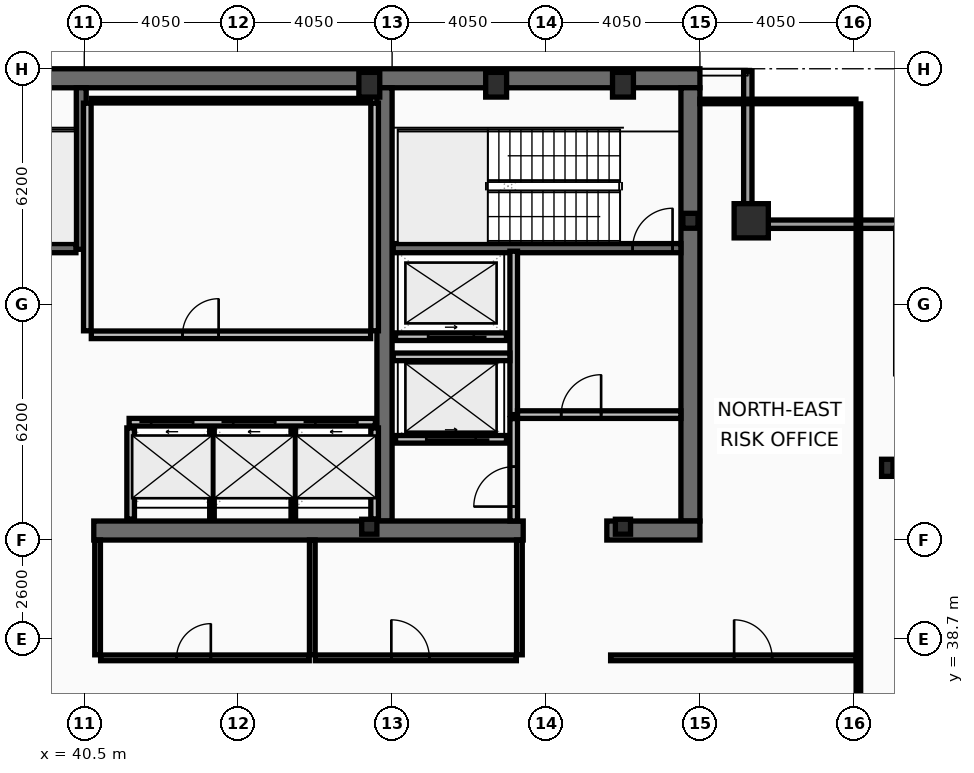
"""IFC4 building model, lengths in metres.
Left out: names, types, materials, properties, quantities, classifications, styles, units other than length and angle.
Written with IfcOpenShell. Run it as: python <this file> out.ifc"""

import sys

from ifc_helpers import new_model, si_unit, direction, frame, frame_2d, origin, origin_2d, place, context, subcontext, project, spatial, rectangle, hollow_rectangle, i_section, extrude, element, fill, save


model = new_model("IFC4")
c1 = context("Model", 3, precision=1e-05, world=origin(), true_north=direction((0.0, 1.0)))
c2 = subcontext(c1, "Body", "Model", "MODEL_VIEW")
j1 = project(units=[si_unit("LENGTHUNIT", "METRE"), si_unit("PLANEANGLEUNIT", "RADIAN")], contexts=[c1])
p1 = place(None, origin())
s1 = spatial("IfcSite", under=j1, at=p1, CompositionType="ELEMENT")
p2 = place(p1, origin())
s2 = spatial("IfcBuilding", under=s1, at=p2, CompositionType="ELEMENT")
p3 = place(p2, frame((0.0, 0.0, 305.8)))
s3 = spatial("IfcBuildingStorey", under=s2, at=p3, CompositionType="ELEMENT", Elevation=305.8)
p4 = place(p3, frame((16.2, 53.45, 0.0), z_axis=(0.0, 0.0, 1.0), x_axis=(1.0, 0.0, 0.0)))
e1 = element("IfcWall", 1, at=p4, inside=s3, PredefinedType="SHEAR", context=c2, shape_type="SweptSolid", body=[
    extrude(rectangle(XDim=40.5, YDim=0.5, at=frame_2d((20.25, 0.0))), origin(), (0.0, 0.0, 1.0), 4.24),
])
p5 = place(p3, frame((56.45, 53.2, 0.0), z_axis=(0.0, 0.0, 1.0), x_axis=(0.0, -1.0, 0.0)))
e2 = element("IfcWall", 2, at=p5, inside=s3, PredefinedType="SHEAR", context=c2, shape_type="SweptSolid", body=[
    extrude(rectangle(XDim=11.4, YDim=0.5, at=frame_2d((5.7, 0.0))), origin(), (0.0, 0.0, 1.0), 4.24),
])
p6 = place(p3, frame((48.4, 41.8, 0.0), z_axis=(0.0, 0.0, 1.0), x_axis=(0.0, 1.0, 0.0)))
e3 = element("IfcWall", 3, at=p6, inside=s3, PredefinedType="SHEAR", context=c2, shape_type="SweptSolid", body=[
    extrude(rectangle(XDim=11.4, YDim=0.4, at=frame_2d((5.7, 0.0))), origin(), (0.0, 0.0, 1.0), 4.24),
])
p7 = place(p3, frame((52.05, 41.55, 0.0), z_axis=(0.0, 0.0, 1.0), x_axis=(-1.0, 0.0, 0.0)))
e4 = element("IfcWall", 4, at=p7, inside=s3, PredefinedType="SHEAR", context=c2, shape_type="SweptSolid", body=[
    extrude(rectangle(XDim=11.3, YDim=0.5, at=frame_2d((5.65, 0.0))), origin(), (0.0, 0.0, 1.0), 4.24),
])
p8 = place(p3, frame((56.7, 41.55, 0.0), z_axis=(0.0, 0.0, 1.0), x_axis=(-1.0, 0.0, 0.0)))
e5 = element("IfcWall", 5, at=p8, inside=s3, PredefinedType="SHEAR", context=c2, shape_type="SweptSolid", body=[
    extrude(rectangle(XDim=2.45, YDim=0.5, at=frame_2d((1.225, 0.0))), origin(), (0.0, 0.0, 1.0), 4.24),
])
p9 = place(p3, frame((40.42, 48.95, 0.0), z_axis=(0.0, 0.0, 1.0), x_axis=(0.0, 1.0, 0.0)))
e6 = element("IfcWall", 6, at=p9, inside=s3, PredefinedType="SHEAR", context=c2, shape_type="SweptSolid", body=[
    extrude(rectangle(XDim=4.25, YDim=0.26, at=frame_2d((2.125, 0.0))), origin(), (0.0, 0.0, 1.0), 4.24),
])
p10 = place(p3, frame((48.63, 48.98, 0.0), z_axis=(0.0, 0.0, 1.0), x_axis=(1.0, 0.0, 0.0)))
e7 = element("IfcWall", 7, at=p10, inside=s3, PredefinedType="SHEAR", context=c2, shape_type="SweptSolid", body=[
    extrude(rectangle(XDim=7.57, YDim=0.24, at=frame_2d((3.785, 0.0))), origin(), (0.0, 0.0, 1.0), 4.24),
])
p11 = place(p10, frame((6.3, 0.0, 0.0)))
e8 = element("IfcOpeningElement", 8, at=p11, cuts=e7, PredefinedType="OPENING", context=c2, shape_type="SweptSolid", body=[
    extrude(rectangle(XDim=1.05, YDim=2.15, at=frame_2d((0.525, 1.075))), frame((0.0, 0.13, 0.0), z_axis=(0.0, -1.0, 0.0), x_axis=(1.0, 0.0, 0.0)), (0.0, 0.0, 1.0), 0.26),
])
p12 = place(p3, frame((32.72, 48.98, 0.0), z_axis=(0.0, 0.0, 1.0), x_axis=(1.0, 0.0, 0.0)))
e9 = element("IfcWall", 9, at=p12, inside=s3, PredefinedType="SHEAR", context=c2, shape_type="SweptSolid", body=[
    extrude(rectangle(XDim=7.56, YDim=0.24, at=frame_2d((3.78, 0.0))), origin(), (0.0, 0.0, 1.0), 4.24),
])
p13 = place(p12, frame((0.22, 0.0, 0.0)))
e10 = element("IfcOpeningElement", 10, at=p13, cuts=e9, PredefinedType="OPENING", context=c2, shape_type="SweptSolid", body=[
    extrude(rectangle(XDim=1.05, YDim=2.15, at=frame_2d((0.525, 1.075))), frame((0.0, 0.13, 0.0), z_axis=(0.0, -1.0, 0.0), x_axis=(1.0, 0.0, 0.0)), (0.0, 0.0, 1.0), 0.26),
])
p14 = place(p3, frame((58.05, 49.7, 0.0), z_axis=(0.0, 0.0, 1.0), x_axis=(1.0, 0.0, 0.0)))
e11 = element("IfcColumn", 11, at=p14, inside=s3, PredefinedType="COLUMN", context=c2, shape_type="SweptSolid", body=[
    extrude(hollow_rectangle(XDim=0.9, YDim=0.9, WallThickness=0.05, at=origin_2d()), origin(), (0.0, 0.0, 1.0), 4.4),
])
for number, where, z_axis, x_axis in (
    (12, (48.0, 53.28, 0.0), (0.0, 0.0, 1.0), (1.0, 0.0, 0.0)),
    (13, (51.337, 53.28, 0.0), (0.0, 0.0, 1.0), (1.0, 0.0, 0.0)),
    (14, (54.675, 53.28, 0.0), (0.0, 0.0, 1.0), (1.0, 0.0, 0.0)),
):
    element("IfcColumn", number, at=place(p3, frame(where, z_axis=z_axis, x_axis=x_axis)), inside=s3, PredefinedType="COLUMN", context=c2, shape_type="SweptSolid", body=[
        extrude(hollow_rectangle(XDim=0.55, YDim=0.65, WallThickness=0.04, at=origin_2d()), origin(), (0.0, 0.0, 1.0), 4.4),
    ])
p15 = place(p3, frame((61.63, 43.2, 0.0), z_axis=(0.0, 0.0, 1.0), x_axis=(1.0, 0.0, 0.0)))
e15 = element("IfcColumn", 15, at=p15, inside=s3, PredefinedType="COLUMN", context=c2, shape_type="SweptSolid", body=[
    extrude(i_section(OverallWidth=0.3, OverallDepth=0.45, WebThickness=0.014, FlangeThickness=0.026, at=origin_2d()), origin(), (0.0, 0.0, 1.0), 4.4),
])
for number, where, z_axis, x_axis in (
    (16, (56.45, 49.7, 0.0), (0.0, 0.0, 1.0), (1.0, 0.0, 0.0)),
    (17, (48.0, 41.65, 0.0), (0.0, 0.0, 1.0), (1.0, 0.0, 0.0)),
    (18, (54.675, 41.65, 0.0), (0.0, 0.0, 1.0), (1.0, 0.0, 0.0)),
):
    element("IfcColumn", number, at=place(p3, frame(where, z_axis=z_axis, x_axis=x_axis)), inside=s3, PredefinedType="COLUMN", context=c2, shape_type="SweptSolid", body=[
        extrude(i_section(OverallWidth=0.399, OverallDepth=0.393, WebThickness=0.023, FlangeThickness=0.037, at=origin_2d()), origin(), (0.0, 0.0, 1.0), 4.4),
    ])
p16 = place(p3, frame((57.96, 53.63, 0.0), z_axis=(0.0, 0.0, 1.0), x_axis=(0.0, -1.0, 0.0)))
e19 = element("IfcWall", 19, at=p16, inside=s3, PredefinedType="SOLIDWALL", context=c2, shape_type="SweptSolid", body=[
    extrude(rectangle(XDim=3.91, YDim=0.22, at=frame_2d((1.955, 0.0))), origin(), (0.0, 0.0, 1.0), 3.68),
])
p17 = place(p3, frame((57.85, 49.61, 0.0), z_axis=(0.0, 0.0, 1.0), x_axis=(1.0, 0.0, 0.0)))
e20 = element("IfcWall", 20, at=p17, inside=s3, PredefinedType="SOLIDWALL", context=c2, shape_type="SweptSolid", body=[
    extrude(rectangle(XDim=4.22, YDim=0.22, at=frame_2d((2.11, 0.0))), origin(), (0.0, 0.0, 1.0), 3.68),
])
p18 = place(p3, frame((41.68, 44.4, 0.0), z_axis=(0.0, 0.0, 1.0), x_axis=(1.0, 0.0, 0.0)))
e21 = element("IfcWall", 21, at=p18, inside=s3, PredefinedType="PARTITIONING", context=c2, shape_type="SweptSolid", body=[
    extrude(rectangle(XDim=6.48, YDim=0.2, at=frame_2d((3.24, 0.0))), origin(), (0.0, 0.0, 1.0), 4.24),
])
p19 = place(p18, frame((0.58, 0.0, 0.0)))
e22 = element("IfcOpeningElement", 22, at=p19, cuts=e21, PredefinedType="OPENING", context=c2, shape_type="SweptSolid", body=[
    extrude(rectangle(XDim=1.1, YDim=2.18, at=frame_2d((0.55, 1.09))), frame((0.0, 0.11, 0.0), z_axis=(0.0, -1.0, 0.0), x_axis=(1.0, 0.0, 0.0)), (0.0, 0.0, 1.0), 0.22),
])
p20 = place(p18, frame((2.74, 0.0, 0.0)))
e23 = element("IfcOpeningElement", 23, at=p20, cuts=e21, PredefinedType="OPENING", context=c2, shape_type="SweptSolid", body=[
    extrude(rectangle(XDim=1.1, YDim=2.18, at=frame_2d((0.55, 1.09))), frame((0.0, 0.11, 0.0), z_axis=(0.0, -1.0, 0.0), x_axis=(1.0, 0.0, 0.0)), (0.0, 0.0, 1.0), 0.22),
])
p21 = place(p18, frame((4.9, 0.0, 0.0)))
e24 = element("IfcOpeningElement", 24, at=p21, cuts=e21, PredefinedType="OPENING", context=c2, shape_type="SweptSolid", body=[
    extrude(rectangle(XDim=1.1, YDim=2.18, at=frame_2d((0.55, 1.09))), frame((0.0, 0.11, 0.0), z_axis=(0.0, -1.0, 0.0), x_axis=(1.0, 0.0, 0.0)), (0.0, 0.0, 1.0), 0.22),
])
p22 = place(p3, frame((51.61, 43.95, 0.0), z_axis=(0.0, 0.0, 1.0), x_axis=(-1.0, 0.0, 0.0)))
e25 = element("IfcWall", 25, at=p22, inside=s3, PredefinedType="PARTITIONING", context=c2, shape_type="SweptSolid", body=[
    extrude(rectangle(XDim=2.92, YDim=0.2, at=frame_2d((1.46, 0.0))), origin(), (0.0, 0.0, 1.0), 4.24),
])
p23 = place(p22, frame((0.81, 0.0, 0.0)))
e26 = element("IfcOpeningElement", 26, at=p23, cuts=e25, PredefinedType="OPENING", context=c2, shape_type="SweptSolid", body=[
    extrude(rectangle(XDim=1.3, YDim=2.18, at=frame_2d((0.65, 1.09))), frame((0.0, 0.11, 0.0), z_axis=(0.0, -1.0, 0.0), x_axis=(1.0, 0.0, 0.0)), (0.0, 0.0, 1.0), 0.22),
])
p24 = place(p3, frame((51.61, 46.65, 0.0), z_axis=(0.0, 0.0, 1.0), x_axis=(-1.0, 0.0, 0.0)))
e27 = element("IfcWall", 27, at=p24, inside=s3, PredefinedType="PARTITIONING", context=c2, shape_type="SweptSolid", body=[
    extrude(rectangle(XDim=2.92, YDim=0.2, at=frame_2d((1.46, 0.0))), origin(), (0.0, 0.0, 1.0), 4.24),
])
p25 = place(p24, frame((0.86, 0.0, 0.0)))
e28 = element("IfcOpeningElement", 28, at=p25, cuts=e27, PredefinedType="OPENING", context=c2, shape_type="SweptSolid", body=[
    extrude(rectangle(XDim=1.2, YDim=2.18, at=frame_2d((0.6, 1.09))), frame((0.0, 0.11, 0.0), z_axis=(0.0, -1.0, 0.0), x_axis=(1.0, 0.0, 0.0)), (0.0, 0.0, 1.0), 0.22),
])
p26 = place(p3, frame((51.8, 44.6, 0.0), z_axis=(0.0, 0.0, 1.0), x_axis=(0.0, 1.0, 0.0)))
e29 = element("IfcWall", 29, at=p26, inside=s3, PredefinedType="PARTITIONING", context=c2, shape_type="SweptSolid", body=[
    extrude(rectangle(XDim=4.3, YDim=0.2, at=frame_2d((2.15, 0.0))), origin(), (0.0, 0.0, 1.0), 4.24),
])
p27 = place(p3, frame((51.9, 44.6, 0.0), z_axis=(0.0, 0.0, 1.0), x_axis=(1.0, 0.0, 0.0)))
e30 = element("IfcWall", 30, at=p27, inside=s3, PredefinedType="PARTITIONING", context=c2, shape_type="SweptSolid", body=[
    extrude(rectangle(XDim=4.3, YDim=0.2, at=frame_2d((2.15, 0.0))), origin(), (0.0, 0.0, 1.0), 4.24),
])
p28 = place(p27, frame((1.15, 0.0, 0.0)))
e31 = element("IfcOpeningElement", 31, at=p28, cuts=e30, PredefinedType="OPENING", context=c2, shape_type="SweptSolid", body=[
    extrude(rectangle(XDim=1.05, YDim=2.15, at=frame_2d((0.525, 1.075))), frame((0.0, 0.11, 0.0), z_axis=(0.0, -1.0, 0.0), x_axis=(1.0, 0.0, 0.0)), (0.0, 0.0, 1.0), 0.22),
])
p29 = place(p3, frame((48.63, 46.12, 0.0), z_axis=(0.0, 0.0, 1.0), x_axis=(1.0, 0.0, 0.0)))
e32 = element("IfcWall", 32, at=p29, inside=s3, PredefinedType="PARTITIONING", context=c2, shape_type="SweptSolid", body=[
    extrude(rectangle(XDim=3.07, YDim=0.2, at=frame_2d((1.535, 0.0))), origin(), (0.0, 0.0, 1.0), 4.24),
])
p30 = place(p3, frame((51.8, 41.8, 0.0), z_axis=(0.0, 0.0, 1.0), x_axis=(0.0, 1.0, 0.0)))
e33 = element("IfcWall", 33, at=p30, inside=s3, PredefinedType="PARTITIONING", context=c2, shape_type="SweptSolid", body=[
    extrude(rectangle(XDim=2.695, YDim=0.2, at=frame_2d((1.348, 0.0))), origin(), (0.0, 0.0, 1.0), 4.24),
])
p31 = place(p30, frame((0.38, 0.0, 0.0)))
e34 = element("IfcOpeningElement", 34, at=p31, cuts=e33, PredefinedType="OPENING", context=c2, shape_type="SweptSolid", body=[
    extrude(rectangle(XDim=1.05, YDim=2.15, at=frame_2d((0.525, 1.075))), frame((0.0, 0.11, 0.0), z_axis=(0.0, -1.0, 0.0), x_axis=(1.0, 0.0, 0.0)), (0.0, 0.0, 1.0), 0.22),
])
for number, where, z_axis, x_axis in (
    (35, (40.58, 46.805, 0.0), (0.0, 0.0, 1.0), (0.0, 1.0, 0.0)),
    (36, (48.14, 46.805, 0.0), (0.0, 0.0, 1.0), (0.0, 1.0, 0.0)),
):
    element("IfcWall", number, at=place(p3, frame(where, z_axis=z_axis, x_axis=x_axis)), inside=s3, PredefinedType="PARTITIONING", context=c2, shape_type="SweptSolid", body=[
        extrude(rectangle(XDim=5.99, YDim=0.2, at=frame_2d((2.995, 0.0))), origin(), (0.0, 0.0, 1.0), 4.24),
    ])
p32 = place(p3, frame((40.685, 52.86, 0.0), z_axis=(0.0, 0.0, 1.0), x_axis=(1.0, 0.0, 0.0)))
e37 = element("IfcWall", 37, at=p32, inside=s3, PredefinedType="PARTITIONING", context=c2, shape_type="SweptSolid", body=[
    extrude(rectangle(XDim=7.35, YDim=0.12, at=frame_2d((3.675, 0.0))), origin(), (0.0, 0.0, 1.0), 4.24),
])
p33 = place(p3, frame((40.685, 46.7, 0.0), z_axis=(0.0, 0.0, 1.0), x_axis=(1.0, 0.0, 0.0)))
e38 = element("IfcWall", 38, at=p33, inside=s3, PredefinedType="PARTITIONING", context=c2, shape_type="SweptSolid", body=[
    extrude(rectangle(XDim=7.35, YDim=0.2, at=frame_2d((3.675, 0.0))), origin(), (0.0, 0.0, 1.0), 4.24),
])
p34 = place(p33, frame((2.4, 0.0, 0.0)))
e39 = element("IfcOpeningElement", 39, at=p34, cuts=e38, PredefinedType="OPENING", context=c2, shape_type="SweptSolid", body=[
    extrude(rectangle(XDim=0.95, YDim=2.1, at=frame_2d((0.475, 1.05))), frame((0.0, 0.11, 0.0), z_axis=(0.0, -1.0, 0.0), x_axis=(1.0, 0.0, 0.0)), (0.0, 0.0, 1.0), 0.22),
])
for number, where, z_axis, x_axis in (
    (40, (41.72, 41.85, 0.0), (0.0, 0.0, 1.0), (0.0, 1.0, 0.0)),
    (41, (48.14, 41.85, 0.0), (0.0, 0.0, 1.0), (0.0, 1.0, 0.0)),
):
    element("IfcWall", number, at=place(p3, frame(where, z_axis=z_axis, x_axis=x_axis)), inside=s3, PredefinedType="PARTITIONING", context=c2, shape_type="SweptSolid", body=[
        extrude(rectangle(XDim=2.4, YDim=0.2, at=frame_2d((1.2, 0.0))), origin(), (0.0, 0.0, 1.0), 4.24),
    ])
for number, where, z_axis, x_axis in (
    (42, (43.86, 41.85, 0.0), (0.0, 0.0, 1.0), (0.0, 1.0, 0.0)),
    (43, (46.0, 41.85, 0.0), (0.0, 0.0, 1.0), (0.0, 1.0, 0.0)),
):
    element("IfcWall", number, at=place(p3, frame(where, z_axis=z_axis, x_axis=x_axis)), inside=s3, PredefinedType="PARTITIONING", context=c2, shape_type="SweptSolid", body=[
        extrude(rectangle(XDim=2.4, YDim=0.12, at=frame_2d((1.2, 0.0))), origin(), (0.0, 0.0, 1.0), 4.24),
    ])
p35 = place(p3, frame((40.93, 38.2, 0.0), z_axis=(0.0, 0.0, 1.0), x_axis=(1.0, 0.0, 0.0)))
e44 = element("IfcWall", 44, at=p35, inside=s3, PredefinedType="PARTITIONING", context=c2, shape_type="SweptSolid", body=[
    extrude(rectangle(XDim=5.49, YDim=0.15, at=frame_2d((2.745, 0.0))), origin(), (0.0, 0.0, 1.0), 4.24),
])
p36 = place(p35, frame((2.0, 0.0, 0.0)))
e45 = element("IfcOpeningElement", 45, at=p36, cuts=e44, PredefinedType="OPENING", context=c2, shape_type="SweptSolid", body=[
    extrude(rectangle(XDim=0.9, YDim=2.05, at=frame_2d((0.45, 1.025))), frame((0.0, 0.085, 0.0), z_axis=(0.0, -1.0, 0.0), x_axis=(1.0, 0.0, 0.0)), (0.0, 0.0, 1.0), 0.17),
])
p37 = place(p3, frame((46.58, 38.2, 0.0), z_axis=(0.0, 0.0, 1.0), x_axis=(1.0, 0.0, 0.0)))
e46 = element("IfcWall", 46, at=p37, inside=s3, PredefinedType="PARTITIONING", context=c2, shape_type="SweptSolid", body=[
    extrude(rectangle(XDim=5.29, YDim=0.15, at=frame_2d((2.645, 0.0))), origin(), (0.0, 0.0, 1.0), 3.58),
])
p38 = place(p37, frame((2.0, 0.0, 0.0)))
e47 = element("IfcOpeningElement", 47, at=p38, cuts=e46, PredefinedType="OPENING", context=c2, shape_type="SweptSolid", body=[
    extrude(rectangle(XDim=1.0, YDim=2.05, at=frame_2d((0.5, 1.025))), frame((0.0, 0.085, 0.0), z_axis=(0.0, -1.0, 0.0), x_axis=(1.0, 0.0, 0.0)), (0.0, 0.0, 1.0), 0.17),
])
for number, where, z_axis, x_axis in (
    (48, (40.85, 38.28, 0.0), (0.0, 0.0, 1.0), (0.0, 1.0, 0.0)),
    (49, (46.5, 38.28, 0.0), (0.0, 0.0, 1.0), (0.0, 1.0, 0.0)),
    (50, (51.95, 38.28, 0.0), (0.0, 0.0, 1.0), (0.0, 1.0, 0.0)),
):
    element("IfcWall", number, at=place(p3, frame(where, z_axis=z_axis, x_axis=x_axis)), inside=s3, PredefinedType="PARTITIONING", context=c2, shape_type="SweptSolid", body=[
        extrude(rectangle(XDim=3.02, YDim=0.15, at=frame_2d((1.51, 0.0))), origin(), (0.0, 0.0, 1.0), 4.24),
    ])
p39 = place(p3, frame((54.35, 38.2, 0.0), z_axis=(0.0, 0.0, 1.0), x_axis=(1.0, 0.0, 0.0)))
e51 = element("IfcWall", 51, at=p39, inside=s3, PredefinedType="PARTITIONING", context=c2, shape_type="SweptSolid", body=[
    extrude(rectangle(XDim=6.455, YDim=0.15, at=frame_2d((3.228, 0.0))), origin(), (0.0, 0.0, 1.0), 3.58),
])
p40 = place(p39, frame((3.25, 0.0, 0.0)))
e52 = element("IfcOpeningElement", 52, at=p40, cuts=e51, PredefinedType="OPENING", context=c2, shape_type="SweptSolid", body=[
    extrude(rectangle(XDim=1.0, YDim=2.05, at=frame_2d((0.5, 1.025))), frame((0.0, 0.085, 0.0), z_axis=(0.0, -1.0, 0.0), x_axis=(1.0, 0.0, 0.0)), (0.0, 0.0, 1.0), 0.17),
])
p41 = place(p3, frame((60.87, 10.665, 0.0), z_axis=(0.0, 0.0, 1.0), x_axis=(0.0, 1.0, 0.0)))
e53 = element("IfcWall", 53, at=p41, inside=s3, PredefinedType="PARTITIONING", context=c2, shape_type="SweptSolid", body=[
    extrude(rectangle(XDim=42.11, YDim=0.12, at=frame_2d((21.055, 0.0))), origin(), (0.0, 0.0, 1.0), 3.58),
])
p42 = place(p3, frame((56.7, 52.84, 0.0), z_axis=(0.0, 0.0, 1.0), x_axis=(1.0, 0.0, 0.0)))
e54 = element("IfcWall", 54, at=p42, inside=s3, PredefinedType="PARTITIONING", context=c2, shape_type="SweptSolid", body=[
    extrude(rectangle(XDim=4.105, YDim=0.12, at=frame_2d((2.052, 0.0))), origin(), (0.0, 0.0, 1.0), 4.24),
])
p43 = place(p11, origin())
e55 = element("IfcDoor", 55, at=p43, inside=s3, OperationType="SINGLE_SWING_RIGHT", PredefinedType="DOOR", context=c2, shape_type="SweptSolid", body=[
    extrude(rectangle(XDim=1.05, YDim=2.15, at=frame_2d((0.525, 1.075))), frame((0.0, 0.025, 0.0), z_axis=(0.0, -1.0, 0.0), x_axis=(1.0, 0.0, 0.0)), (0.0, 0.0, 1.0), 0.05),
])
fill(e8, e55)
p44 = place(p19, origin())
e56 = element("IfcDoor", 56, at=p44, inside=s3, OperationType="SLIDING_TO_LEFT", PredefinedType="DOOR", context=c2, shape_type="SweptSolid", body=[
    extrude(rectangle(XDim=1.1, YDim=2.18, at=frame_2d((0.55, 1.09))), frame((0.0, 0.025, 0.0), z_axis=(0.0, -1.0, 0.0), x_axis=(1.0, 0.0, 0.0)), (0.0, 0.0, 1.0), 0.05),
])
fill(e22, e56)
p45 = place(p20, origin())
e57 = element("IfcDoor", 57, at=p45, inside=s3, OperationType="SLIDING_TO_LEFT", PredefinedType="DOOR", context=c2, shape_type="SweptSolid", body=[
    extrude(rectangle(XDim=1.1, YDim=2.18, at=frame_2d((0.55, 1.09))), frame((0.0, 0.025, 0.0), z_axis=(0.0, -1.0, 0.0), x_axis=(1.0, 0.0, 0.0)), (0.0, 0.0, 1.0), 0.05),
])
fill(e23, e57)
p46 = place(p21, origin())
e58 = element("IfcDoor", 58, at=p46, inside=s3, OperationType="SLIDING_TO_LEFT", PredefinedType="DOOR", context=c2, shape_type="SweptSolid", body=[
    extrude(rectangle(XDim=1.1, YDim=2.18, at=frame_2d((0.55, 1.09))), frame((0.0, 0.025, 0.0), z_axis=(0.0, -1.0, 0.0), x_axis=(1.0, 0.0, 0.0)), (0.0, 0.0, 1.0), 0.05),
])
fill(e24, e58)
p47 = place(p23, origin())
e59 = element("IfcDoor", 59, at=p47, inside=s3, OperationType="SLIDING_TO_LEFT", PredefinedType="DOOR", context=c2, shape_type="SweptSolid", body=[
    extrude(rectangle(XDim=1.3, YDim=2.18, at=frame_2d((0.65, 1.09))), frame((0.0, 0.025, 0.0), z_axis=(0.0, -1.0, 0.0), x_axis=(1.0, 0.0, 0.0)), (0.0, 0.0, 1.0), 0.05),
])
fill(e26, e59)
p48 = place(p25, origin())
e60 = element("IfcDoor", 60, at=p48, inside=s3, OperationType="SLIDING_TO_LEFT", PredefinedType="DOOR", context=c2, shape_type="SweptSolid", body=[
    extrude(rectangle(XDim=1.2, YDim=2.18, at=frame_2d((0.6, 1.09))), frame((0.0, 0.025, 0.0), z_axis=(0.0, -1.0, 0.0), x_axis=(1.0, 0.0, 0.0)), (0.0, 0.0, 1.0), 0.05),
])
fill(e28, e60)
p49 = place(p28, origin())
e61 = element("IfcDoor", 61, at=p49, inside=s3, OperationType="SINGLE_SWING_RIGHT", PredefinedType="DOOR", context=c2, shape_type="SweptSolid", body=[
    extrude(rectangle(XDim=1.05, YDim=2.15, at=frame_2d((0.525, 1.075))), frame((0.0, 0.025, 0.0), z_axis=(0.0, -1.0, 0.0), x_axis=(1.0, 0.0, 0.0)), (0.0, 0.0, 1.0), 0.05),
])
fill(e31, e61)
p50 = place(p31, origin())
e62 = element("IfcDoor", 62, at=p50, inside=s3, OperationType="SINGLE_SWING_LEFT", PredefinedType="DOOR", context=c2, shape_type="SweptSolid", body=[
    extrude(rectangle(XDim=1.05, YDim=2.15, at=frame_2d((0.525, 1.075))), frame((0.0, 0.025, 0.0), z_axis=(0.0, -1.0, 0.0), x_axis=(1.0, 0.0, 0.0)), (0.0, 0.0, 1.0), 0.05),
])
fill(e34, e62)
p51 = place(p34, origin())
e63 = element("IfcDoor", 63, at=p51, inside=s3, OperationType="SINGLE_SWING_RIGHT", PredefinedType="DOOR", context=c2, shape_type="SweptSolid", body=[
    extrude(rectangle(XDim=0.95, YDim=2.1, at=frame_2d((0.475, 1.05))), frame((0.0, 0.025, 0.0), z_axis=(0.0, -1.0, 0.0), x_axis=(1.0, 0.0, 0.0)), (0.0, 0.0, 1.0), 0.05),
])
fill(e39, e63)
p52 = place(p36, origin())
e64 = element("IfcDoor", 64, at=p52, inside=s3, OperationType="SINGLE_SWING_RIGHT", PredefinedType="DOOR", context=c2, shape_type="SweptSolid", body=[
    extrude(rectangle(XDim=0.9, YDim=2.05, at=frame_2d((0.45, 1.025))), frame((0.0, 0.025, 0.0), z_axis=(0.0, -1.0, 0.0), x_axis=(1.0, 0.0, 0.0)), (0.0, 0.0, 1.0), 0.05),
])
fill(e45, e64)
p53 = place(p38, origin())
e65 = element("IfcDoor", 65, at=p53, inside=s3, OperationType="SINGLE_SWING_LEFT", PredefinedType="DOOR", context=c2, shape_type="SweptSolid", body=[
    extrude(rectangle(XDim=1.0, YDim=2.05, at=frame_2d((0.5, 1.025))), frame((0.0, 0.025, 0.0), z_axis=(0.0, -1.0, 0.0), x_axis=(1.0, 0.0, 0.0)), (0.0, 0.0, 1.0), 0.05),
])
fill(e47, e65)
p54 = place(p40, origin())
e66 = element("IfcDoor", 66, at=p54, inside=s3, OperationType="SINGLE_SWING_LEFT", PredefinedType="DOOR", context=c2, shape_type="SweptSolid", body=[
    extrude(rectangle(XDim=1.0, YDim=2.05, at=frame_2d((0.5, 1.025))), frame((0.0, 0.025, 0.0), z_axis=(0.0, -1.0, 0.0), x_axis=(1.0, 0.0, 0.0)), (0.0, 0.0, 1.0), 0.05),
])
fill(e52, e66)
save(model, sys.argv[1])
